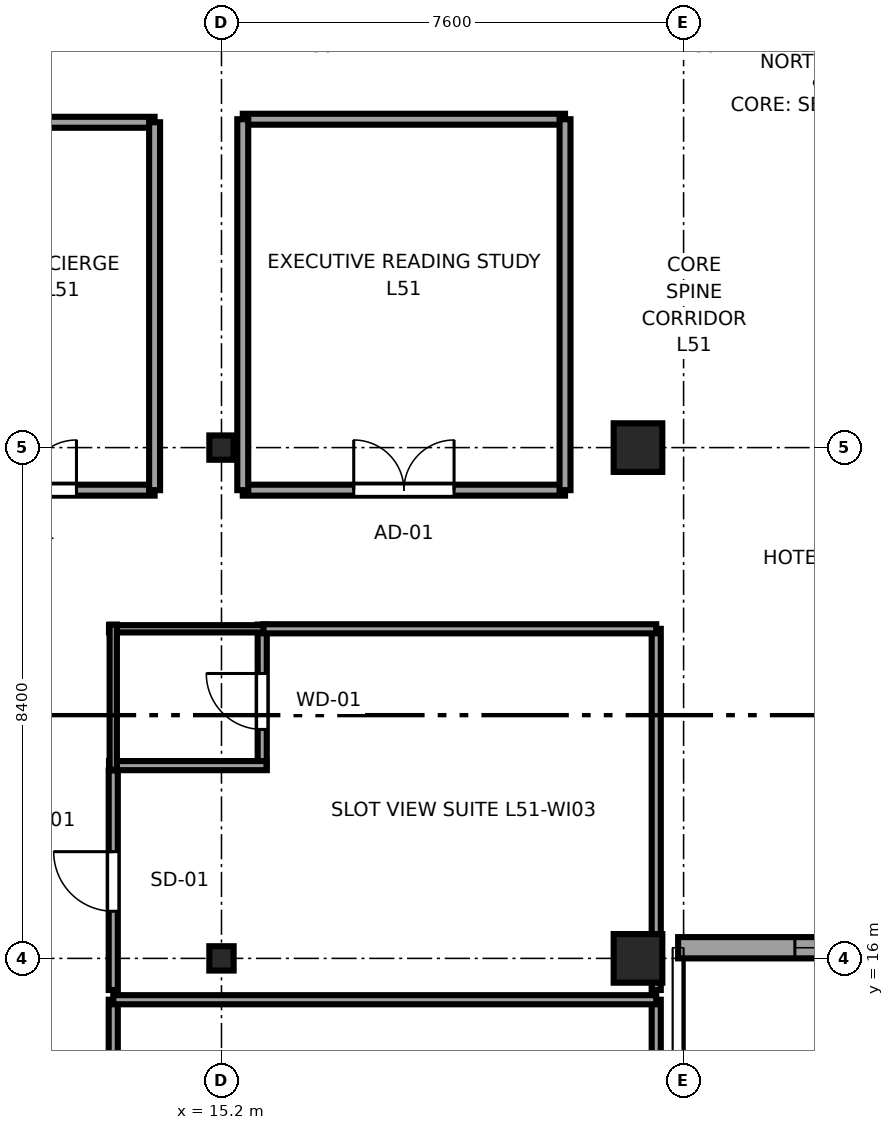
"""IFC4 building model, lengths in metres.
Left out: names, types, materials, properties, quantities, classifications, styles, units other than length and angle.
Written with IfcOpenShell. Run it as: python <this file> out.ifc"""

import sys

from ifc_helpers import new_model, si_unit, direction, frame, frame_2d, origin, origin_2d, place, context, subcontext, project, spatial, rectangle, i_section, extrude, source, transform, mapped, element, fill, save


model = new_model("IFC4")
c1 = context("Model", 3, precision=1e-05, world=origin(), true_north=direction((0.0, 1.0)))
c2 = subcontext(c1, "Body", "Model", "MODEL_VIEW")
j1 = project(units=[si_unit("LENGTHUNIT", "METRE"), si_unit("PLANEANGLEUNIT", "RADIAN")], contexts=[c1])
p1 = place(None, origin())
s1 = spatial("IfcSite", under=j1, at=p1, CompositionType="ELEMENT")
p2 = place(p1, origin())
s2 = spatial("IfcBuilding", under=s1, at=p2, CompositionType="ELEMENT")
p3 = place(p2, frame((0.0, 0.0, 194.65)))
s3 = spatial("IfcBuildingStorey", under=s2, at=p3, CompositionType="ELEMENT", Elevation=194.65)
m1 = source(origin(), c2, "Body", "SweptSolid", [
    extrude(i_section(OverallWidth=0.4, OverallDepth=0.4, WebThickness=0.02, FlangeThickness=0.035, at=origin_2d()), origin(), (0.0, 0.0, 1.0), 3.55),
])
for number, where, z_axis, x_axis in (
    (1, (15.2, 16.0, 0.0), (0.0, 0.0, 1.0), (1.0, 0.0, 0.0)),
    (2, (15.2, 24.4, 0.0), (0.0, 0.0, 1.0), (1.0, 0.0, 0.0)),
):
    element("IfcColumn", number, at=place(p3, frame(where, z_axis=z_axis, x_axis=x_axis)), inside=s3, PredefinedType="COLUMN", context=c2, shape_type="MappedRepresentation", body=[
        mapped(m1, transform((0.0, 0.0, 0.0), x_axis=(1.0, 0.0, 0.0), y_axis=(0.0, 1.0, 0.0), z_axis=(0.0, 0.0, 1.0), scale=1.0)),
    ])
m2 = source(origin(), c2, "Body", "SweptSolid", [
    extrude(rectangle(XDim=0.8, YDim=0.8, at=origin_2d()), origin(), (0.0, 0.0, 1.0), 3.55),
])
for number, where, z_axis, x_axis in (
    (3, (22.05, 16.0, 0.0), (0.0, 0.0, 1.0), (1.0, 0.0, 0.0)),
    (4, (22.05, 24.4, 0.0), (0.0, 0.0, 1.0), (1.0, 0.0, 0.0)),
):
    element("IfcColumn", number, at=place(p3, frame(where, z_axis=z_axis, x_axis=x_axis)), inside=s3, PredefinedType="COLUMN", context=c2, shape_type="MappedRepresentation", body=[
        mapped(m2, transform((0.0, 0.0, 0.0), x_axis=(1.0, 0.0, 0.0), y_axis=(0.0, 1.0, 0.0), z_axis=(0.0, 0.0, 1.0), scale=1.0)),
    ])
p4 = place(p3, frame((22.71, 16.175, 0.0), z_axis=(0.0, 0.0, 1.0), x_axis=(1.0, 0.0, 0.0)))
e5 = element("IfcWall", 5, at=p4, inside=s3, PredefinedType="SOLIDWALL", context=c2, shape_type="SweptSolid", body=[
    extrude(rectangle(XDim=11.58, YDim=0.35, at=frame_2d((5.79, 0.0))), origin(), (0.0, 0.0, 1.0), 2.758),
])
p5 = place(p4, frame((1.92, 0.0, 0.68)))
e6 = element("IfcOpeningElement", 6, at=p5, cuts=e5, PredefinedType="OPENING", context=c2, shape_type="SweptSolid", body=[
    extrude(rectangle(XDim=2.55, YDim=1.92, at=frame_2d((1.275, 0.96))), frame((0.0, 0.185, 0.0), z_axis=(0.0, -1.0, 0.0), x_axis=(1.0, 0.0, 0.0)), (0.0, 0.0, 1.0), 0.37),
])
p6 = place(p4, frame((7.11, 0.0, 0.68)))
e7 = element("IfcOpeningElement", 7, at=p6, cuts=e5, PredefinedType="OPENING", context=c2, shape_type="SweptSolid", body=[
    extrude(rectangle(XDim=2.55, YDim=1.92, at=frame_2d((1.275, 0.96))), frame((0.0, 0.185, 0.0), z_axis=(0.0, -1.0, 0.0), x_axis=(1.0, 0.0, 0.0)), (0.0, 0.0, 1.0), 0.37),
])
p7 = place(p3, frame((15.87, 19.1, 0.0), z_axis=(0.0, 0.0, 1.0), x_axis=(0.0, 1.0, 0.0)))
e8 = element("IfcWall", 8, at=p7, inside=s3, PredefinedType="PARTITIONING", context=c2, shape_type="SweptSolid", body=[
    extrude(rectangle(XDim=2.39, YDim=0.15, at=frame_2d((1.195, 0.0))), origin(), (0.0, 0.0, 1.0), 3.37),
])
p8 = place(p7, frame((0.665, 0.0, 0.0)))
e9 = element("IfcOpeningElement", 9, at=p8, cuts=e8, PredefinedType="OPENING", context=c2, shape_type="SweptSolid", body=[
    extrude(rectangle(XDim=0.92, YDim=2.01, at=frame_2d((0.46, 1.005))), frame((0.0, 0.085, 0.0), z_axis=(0.0, -1.0, 0.0), x_axis=(1.0, 0.0, 0.0)), (0.0, 0.0, 1.0), 0.17),
])
p9 = place(p3, frame((13.35, 19.17, 0.0), z_axis=(0.0, 0.0, 1.0), x_axis=(1.0, 0.0, 0.0)))
e10 = element("IfcWall", 10, at=p9, inside=s3, PredefinedType="PARTITIONING", context=c2, shape_type="SweptSolid", body=[
    extrude(rectangle(XDim=2.59, YDim=0.15, at=frame_2d((1.295, 0.0))), origin(), (0.0, 0.0, 1.0), 3.37),
])
p10 = place(p3, frame((13.35, 21.42, 0.0), z_axis=(0.0, 0.0, 1.0), x_axis=(1.0, 0.0, 0.0)))
e11 = element("IfcWall", 11, at=p10, inside=s3, PredefinedType="PLUMBINGWALL", context=c2, shape_type="SweptSolid", body=[
    extrude(rectangle(XDim=2.59, YDim=0.12, at=frame_2d((1.295, 0.0))), origin(), (0.0, 0.0, 1.0), 3.37),
])
p11 = place(p3, frame((13.42, 19.1, 0.0), z_axis=(0.0, 0.0, 1.0), x_axis=(0.0, 1.0, 0.0)))
e12 = element("IfcWall", 12, at=p11, inside=s3, PredefinedType="PLUMBINGWALL", context=c2, shape_type="SweptSolid", body=[
    extrude(rectangle(XDim=2.39, YDim=0.12, at=frame_2d((1.195, 0.0))), origin(), (0.0, 0.0, 1.0), 3.37),
])
p12 = place(p3, frame((13.42, 11.61, 0.0), z_axis=(0.0, 0.0, 1.0), x_axis=(0.0, 1.0, 0.0)))
e13 = element("IfcWall", 13, at=p12, inside=s3, PredefinedType="PARTITIONING", context=c2, shape_type="SweptSolid", body=[
    extrude(rectangle(XDim=3.71, YDim=0.15, at=frame_2d((1.855, 0.0))), origin(), (0.0, 0.0, 1.0), 3.37),
])
p13 = place(p12, frame((1.345, 0.0, 0.0)))
e14 = element("IfcOpeningElement", 14, at=p13, cuts=e13, PredefinedType="OPENING", context=c2, shape_type="SweptSolid", body=[
    extrude(rectangle(XDim=0.98, YDim=2.12, at=frame_2d((0.49, 1.06))), frame((0.0, 0.085, 0.0), z_axis=(0.0, -1.0, 0.0), x_axis=(1.0, 0.0, 0.0)), (0.0, 0.0, 1.0), 0.17),
])
p14 = place(p3, frame((22.35, 9.28, 0.0), z_axis=(0.0, 0.0, 1.0), x_axis=(0.0, 1.0, 0.0)))
e15 = element("IfcWall", 15, at=p14, inside=s3, PredefinedType="PARTITIONING", context=c2, shape_type="SweptSolid", body=[
    extrude(rectangle(XDim=6.04, YDim=0.15, at=frame_2d((3.02, 0.0))), origin(), (0.0, 0.0, 1.0), 3.37),
])
p15 = place(p3, frame((13.42, 15.32, 0.0), z_axis=(0.0, 0.0, 1.0), x_axis=(1.0, 0.0, 0.0)))
e16 = element("IfcWall", 16, at=p15, inside=s3, PredefinedType="PARTITIONING", context=c2, shape_type="SweptSolid", body=[
    extrude(rectangle(XDim=8.93, YDim=0.15, at=frame_2d((4.465, 0.0))), origin(), (0.0, 0.0, 1.0), 3.37),
])
p16 = place(p3, frame((13.42, 15.48, 0.0), z_axis=(0.0, 0.0, 1.0), x_axis=(0.0, 1.0, 0.0)))
e17 = element("IfcWall", 17, at=p16, inside=s3, PredefinedType="PARTITIONING", context=c2, shape_type="SweptSolid", body=[
    extrude(rectangle(XDim=3.61, YDim=0.15, at=frame_2d((1.805, 0.0))), origin(), (0.0, 0.0, 1.0), 3.37),
])
p17 = place(p16, frame((1.295, 0.0, 0.0)))
e18 = element("IfcOpeningElement", 18, at=p17, cuts=e17, PredefinedType="OPENING", context=c2, shape_type="SweptSolid", body=[
    extrude(rectangle(XDim=0.98, YDim=2.12, at=frame_2d((0.49, 1.06))), frame((0.0, 0.085, 0.0), z_axis=(0.0, -1.0, 0.0), x_axis=(1.0, 0.0, 0.0)), (0.0, 0.0, 1.0), 0.17),
])
p18 = place(p3, frame((22.35, 15.48, 0.0), z_axis=(0.0, 0.0, 1.0), x_axis=(0.0, 1.0, 0.0)))
e19 = element("IfcWall", 19, at=p18, inside=s3, PredefinedType="PARTITIONING", context=c2, shape_type="SweptSolid", body=[
    extrude(rectangle(XDim=5.94, YDim=0.15, at=frame_2d((2.97, 0.0))), origin(), (0.0, 0.0, 1.0), 3.37),
])
p19 = place(p3, frame((15.89, 21.42, 0.0), z_axis=(0.0, 0.0, 1.0), x_axis=(1.0, 0.0, 0.0)))
e20 = element("IfcWall", 20, at=p19, inside=s3, PredefinedType="PARTITIONING", context=c2, shape_type="SweptSolid", body=[
    extrude(rectangle(XDim=6.46, YDim=0.15, at=frame_2d((3.23, 0.0))), origin(), (0.0, 0.0, 1.0), 3.37),
])
p20 = place(p3, frame((9.88, 23.7, 0.0), z_axis=(0.0, 0.0, 1.0), x_axis=(1.0, 0.0, 0.0)))
e21 = element("IfcWall", 21, at=p20, inside=s3, PredefinedType="PARTITIONING", context=c2, shape_type="SweptSolid", body=[
    extrude(rectangle(XDim=4.22, YDim=0.18, at=frame_2d((2.11, 0.0))), origin(), (0.0, 0.0, 1.0), 3.37),
])
p21 = place(p20, frame((1.285, 0.0, 0.0)))
e22 = element("IfcOpeningElement", 22, at=p21, cuts=e21, PredefinedType="OPENING", context=c2, shape_type="SweptSolid", body=[
    extrude(rectangle(XDim=1.65, YDim=2.15, at=frame_2d((0.825, 1.075))), frame((0.0, 0.1, 0.0), z_axis=(0.0, -1.0, 0.0), x_axis=(1.0, 0.0, 0.0)), (0.0, 0.0, 1.0), 0.2),
])
p22 = place(p3, frame((9.88, 29.75, 0.0), z_axis=(0.0, 0.0, 1.0), x_axis=(1.0, 0.0, 0.0)))
e23 = element("IfcWall", 23, at=p22, inside=s3, PredefinedType="PARTITIONING", context=c2, shape_type="SweptSolid", body=[
    extrude(rectangle(XDim=4.22, YDim=0.18, at=frame_2d((2.11, 0.0))), origin(), (0.0, 0.0, 1.0), 3.37),
])
p23 = place(p3, frame((14.1, 23.7, 0.0), z_axis=(0.0, 0.0, 1.0), x_axis=(0.0, 1.0, 0.0)))
e24 = element("IfcWall", 24, at=p23, inside=s3, PredefinedType="PARTITIONING", context=c2, shape_type="SweptSolid", body=[
    extrude(rectangle(XDim=6.05, YDim=0.18, at=frame_2d((3.025, 0.0))), origin(), (0.0, 0.0, 1.0), 3.37),
])
p24 = place(p3, frame((15.55, 23.7, 0.0), z_axis=(0.0, 0.0, 1.0), x_axis=(1.0, 0.0, 0.0)))
e25 = element("IfcWall", 25, at=p24, inside=s3, PredefinedType="PARTITIONING", context=c2, shape_type="SweptSolid", body=[
    extrude(rectangle(XDim=5.3, YDim=0.18, at=frame_2d((2.65, 0.0))), origin(), (0.0, 0.0, 1.0), 3.37),
])
p25 = place(p24, frame((1.825, 0.0, 0.0)))
e26 = element("IfcOpeningElement", 26, at=p25, cuts=e25, PredefinedType="OPENING", context=c2, shape_type="SweptSolid", body=[
    extrude(rectangle(XDim=1.65, YDim=2.15, at=frame_2d((0.825, 1.075))), frame((0.0, 0.1, 0.0), z_axis=(0.0, -1.0, 0.0), x_axis=(1.0, 0.0, 0.0)), (0.0, 0.0, 1.0), 0.2),
])
p26 = place(p3, frame((15.55, 29.8, 0.0), z_axis=(0.0, 0.0, 1.0), x_axis=(1.0, 0.0, 0.0)))
e27 = element("IfcWall", 27, at=p26, inside=s3, PredefinedType="PARTITIONING", context=c2, shape_type="SweptSolid", body=[
    extrude(rectangle(XDim=5.3, YDim=0.18, at=frame_2d((2.65, 0.0))), origin(), (0.0, 0.0, 1.0), 3.37),
])
for number, where, z_axis, x_axis in (
    (28, (15.55, 23.7, 0.0), (0.0, 0.0, 1.0), (0.0, 1.0, 0.0)),
    (29, (20.85, 23.7, 0.0), (0.0, 0.0, 1.0), (0.0, 1.0, 0.0)),
):
    element("IfcWall", number, at=place(p3, frame(where, z_axis=z_axis, x_axis=x_axis)), inside=s3, PredefinedType="PARTITIONING", context=c2, shape_type="SweptSolid", body=[
        extrude(rectangle(XDim=6.1, YDim=0.18, at=frame_2d((3.05, 0.0))), origin(), (0.0, 0.0, 1.0), 3.37),
    ])
m3 = source(origin(), c2, "Body", "SweptSolid", [
    extrude(rectangle(XDim=2.55, YDim=1.92, at=frame_2d((1.275, 0.96))), frame((0.0, 0.09, 0.0), z_axis=(0.0, -1.0, 0.0), x_axis=(1.0, 0.0, 0.0)), (0.0, 0.0, 1.0), 0.06),
])
p27 = place(p5, origin())
e30 = element("IfcWindow", 30, at=p27, inside=s3, PartitioningType="TRIPLE_PANEL_HORIZONTAL", PredefinedType="WINDOW", context=c2, shape_type="MappedRepresentation", body=[
    mapped(m3, transform((0.0, 0.0, 0.0), x_axis=(1.0, 0.0, 0.0), y_axis=(0.0, 1.0, 0.0), z_axis=(0.0, 0.0, 1.0), scale=1.0)),
])
fill(e6, e30)
m4 = source(origin(), c2, "Body", "SweptSolid", [
    extrude(rectangle(XDim=0.92, YDim=2.01, at=frame_2d((0.46, 1.005))), frame((0.0, 0.025, 0.0), z_axis=(0.0, -1.0, 0.0), x_axis=(1.0, 0.0, 0.0)), (0.0, 0.0, 1.0), 0.05),
])
p28 = place(p8, origin())
e31 = element("IfcDoor", 31, at=p28, inside=s3, OperationType="SINGLE_SWING_RIGHT", PredefinedType="DOOR", context=c2, shape_type="MappedRepresentation", body=[
    mapped(m4, transform((0.0, 0.0, 0.0), x_axis=(1.0, 0.0, 0.0), y_axis=(0.0, 1.0, 0.0), z_axis=(0.0, 0.0, 1.0), scale=1.0)),
])
fill(e9, e31)
m5 = source(origin(), c2, "Body", "SweptSolid", [
    extrude(rectangle(XDim=0.98, YDim=2.12, at=frame_2d((0.49, 1.06))), frame((0.0, 0.025, 0.0), z_axis=(0.0, -1.0, 0.0), x_axis=(1.0, 0.0, 0.0)), (0.0, 0.0, 1.0), 0.05),
])
p29 = place(p17, origin())
e32 = element("IfcDoor", 32, at=p29, inside=s3, OperationType="SINGLE_SWING_RIGHT", PredefinedType="DOOR", context=c2, shape_type="MappedRepresentation", body=[
    mapped(m5, transform((0.0, 0.0, 0.0), x_axis=(1.0, 0.0, 0.0), y_axis=(0.0, 1.0, 0.0), z_axis=(0.0, 0.0, 1.0), scale=1.0)),
])
fill(e18, e32)
m6 = source(origin(), c2, "Body", "SweptSolid", [
    extrude(rectangle(XDim=1.65, YDim=2.15, at=frame_2d((0.825, 1.075))), frame((0.0, 0.025, 0.0), z_axis=(0.0, -1.0, 0.0), x_axis=(1.0, 0.0, 0.0)), (0.0, 0.0, 1.0), 0.05),
])
p30 = place(p21, origin())
e33 = element("IfcDoor", 33, at=p30, inside=s3, OperationType="DOUBLE_DOOR_SINGLE_SWING", PredefinedType="DOOR", context=c2, shape_type="MappedRepresentation", body=[
    mapped(m6, transform((0.0, 0.0, 0.0), x_axis=(1.0, 0.0, 0.0), y_axis=(0.0, 1.0, 0.0), z_axis=(0.0, 0.0, 1.0), scale=1.0)),
])
fill(e22, e33)
p31 = place(p25, origin())
e34 = element("IfcDoor", 34, at=p31, inside=s3, OperationType="DOUBLE_DOOR_SINGLE_SWING", PredefinedType="DOOR", context=c2, shape_type="MappedRepresentation", body=[
    mapped(m6, transform((0.0, 0.0, 0.0), x_axis=(1.0, 0.0, 0.0), y_axis=(0.0, 1.0, 0.0), z_axis=(0.0, 0.0, 1.0), scale=1.0)),
])
fill(e26, e34)
save(model, sys.argv[1])
